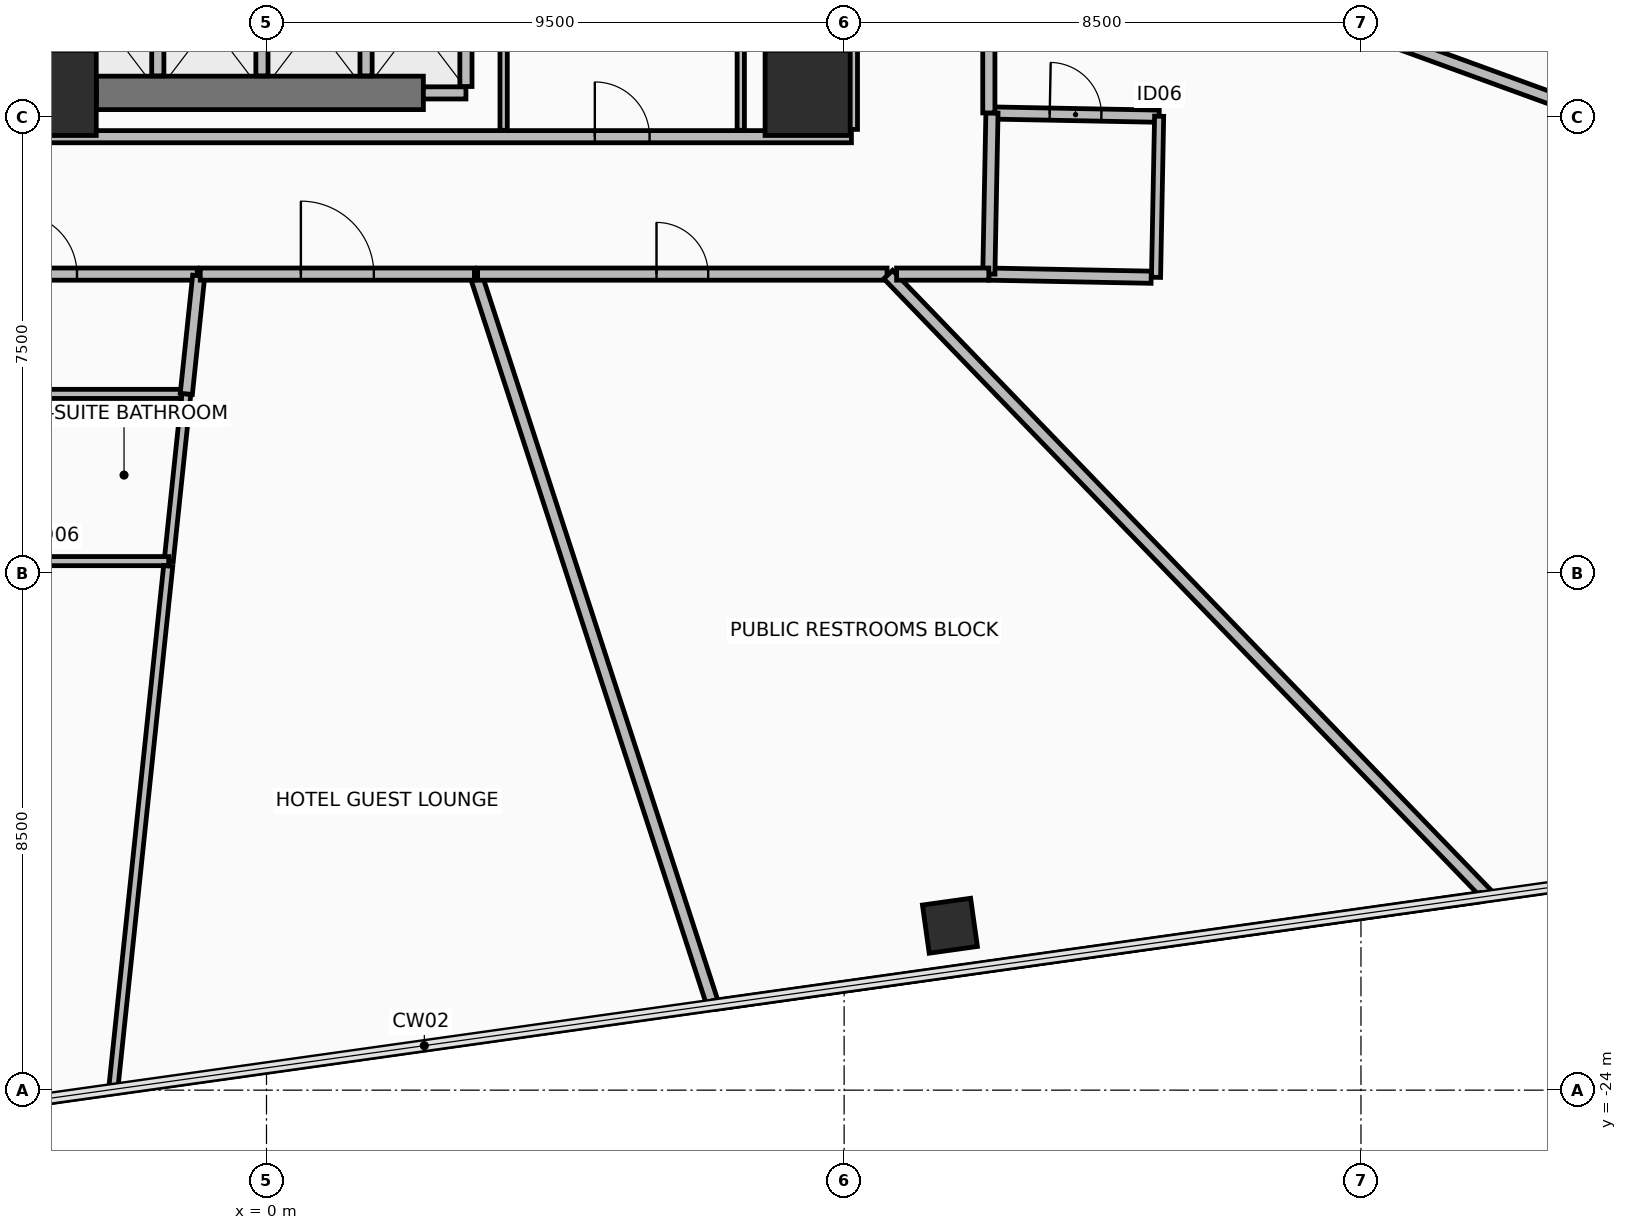
"""IFC4 building model, lengths in metres.
Left out: names, types, materials, properties, quantities, classifications, styles, units other than length and angle.
Written with IfcOpenShell. Run it as: python <this file> out.ifc"""

import sys

from ifc_helpers import new_model, si_unit, direction, frame, frame_2d, origin, origin_2d, place, context, subcontext, project, spatial, rectangle, hollow_rectangle, extrude, element, fill, save


model = new_model("IFC4")
c1 = context("Model", 3, precision=1e-05, world=origin(), true_north=direction((0.0, 1.0)))
c2 = subcontext(c1, "Body", "Model", "MODEL_VIEW")
j1 = project(units=[si_unit("LENGTHUNIT", "METRE"), si_unit("PLANEANGLEUNIT", "RADIAN")], contexts=[c1])
p1 = place(None, origin())
s1 = spatial("IfcSite", under=j1, at=p1, CompositionType="ELEMENT")
p2 = place(p1, origin())
s2 = spatial("IfcBuilding", under=s1, at=p2, CompositionType="ELEMENT")
p3 = place(p2, frame((0.0, 0.0, 63.85)))
s3 = spatial("IfcBuildingStorey", under=s2, at=p3, CompositionType="ELEMENT", Elevation=63.85)
for number, where, z_axis, x_axis in (
    (1, (-3.5, -7.6, 0.0), (0.0, 0.0, 1.0), (1.0, 0.0, 0.0)),
    (2, (8.9, -7.6, 0.0), (0.0, 0.0, 1.0), (1.0, 0.0, 0.0)),
):
    element("IfcColumn", number, at=place(p3, frame(where, z_axis=z_axis, x_axis=x_axis)), inside=s3, PredefinedType="COLUMN", context=c2, shape_type="SweptSolid", body=[
        extrude(rectangle(XDim=1.4, YDim=1.4, at=origin_2d()), origin(), (0.0, 0.0, 1.0), 3.45),
    ])
p4 = place(p3, frame((11.24, -21.296, 0.0), z_axis=(0.0, 0.0, 1.0), x_axis=(0.990268068742, 0.13917310096, 0.0)))
e3 = element("IfcColumn", 3, at=p4, inside=s3, PredefinedType="COLUMN", context=c2, shape_type="SweptSolid", body=[
    extrude(hollow_rectangle(XDim=0.8, YDim=0.8, WallThickness=0.045, at=origin_2d()), origin(), (0.0, 0.0, 1.0), 3.45),
])
p5 = place(p3, frame((-2.8, -7.6, 0.0), z_axis=(0.0, 0.0, 1.0), x_axis=(1.0, 0.0, 0.0)))
e4 = element("IfcWall", 4, at=p5, inside=s3, PredefinedType="SHEAR", context=c2, shape_type="SweptSolid", body=[
    extrude(rectangle(XDim=5.38, YDim=0.55, at=frame_2d((2.69, 0.0))), origin(), (0.0, 0.0, 1.0), 3.275),
])
p6 = place(p3, frame((-9.62, -8.32, 0.0), z_axis=(0.0, 0.0, 1.0), x_axis=(1.0, 0.0, 0.0)))
e5 = element("IfcWall", 5, at=p6, inside=s3, PredefinedType="PARTITIONING", context=c2, shape_type="SweptSolid", body=[
    extrude(rectangle(XDim=19.24, YDim=0.2, at=frame_2d((9.62, 0.0))), origin(), (0.0, 0.0, 1.0), 2.67),
])
p7 = place(p6, frame((15.02, 0.0, 0.0)))
e6 = element("IfcOpeningElement", 6, at=p7, cuts=e5, PredefinedType="OPENING", context=c2, shape_type="SweptSolid", body=[
    extrude(rectangle(XDim=0.9, YDim=2.1, at=frame_2d((0.45, 1.05))), frame((0.0, 0.11, 0.0), z_axis=(0.0, -1.0, 0.0), x_axis=(1.0, 0.0, 0.0)), (0.0, 0.0, 1.0), 0.22),
])
p8 = place(p3, frame((9.62, -8.2, 0.0), z_axis=(0.0, 0.0, 1.0), x_axis=(0.0, 1.0, 0.0)))
e7 = element("IfcWall", 7, at=p8, inside=s3, PredefinedType="PARTITIONING", context=c2, shape_type="SweptSolid", body=[
    extrude(rectangle(XDim=16.4, YDim=0.2, at=frame_2d((8.2, 0.0))), origin(), (0.0, 0.0, 1.0), 2.67),
])
p9 = place(p8, frame((12.65, 0.0, 0.0)))
e8 = element("IfcOpeningElement", 8, at=p9, cuts=e7, PredefinedType="OPENING", context=c2, shape_type="SweptSolid", body=[
    extrude(rectangle(XDim=1.1, YDim=2.15, at=frame_2d((0.55, 1.075))), frame((0.0, 0.11, 0.0), z_axis=(0.0, -1.0, 0.0), x_axis=(1.0, 0.0, 0.0)), (0.0, 0.0, 1.0), 0.22),
])
p10 = place(p3, frame((-3.5, -7.6, 0.0), z_axis=(0.0, 0.0, 1.0), x_axis=(1.0, 0.0, 0.0)))
e9 = element("IfcWall", 9, at=p10, inside=s3, PredefinedType="PARTITIONING", context=c2, shape_type="SweptSolid", body=[
    extrude(rectangle(XDim=0.7, YDim=0.2, at=frame_2d((0.35, 0.0))), origin(), (0.0, 0.0, 1.0), 2.47),
])
p11 = place(p3, frame((-3.5, -7.495, 0.0), z_axis=(0.0, 0.0, 1.0), x_axis=(0.0, 1.0, 0.0)))
e10 = element("IfcWall", 10, at=p11, inside=s3, PredefinedType="PARTITIONING", context=c2, shape_type="SweptSolid", body=[
    extrude(rectangle(XDim=2.065, YDim=0.2, at=frame_2d((1.033, 0.0))), origin(), (0.0, 0.0, 1.0), 2.47),
])
for number, where, z_axis, x_axis in (
    (11, (-1.788, -7.32, 0.0), (0.0, 0.0, 1.0), (0.0, 1.0, 0.0)),
    (12, (-0.075, -7.32, 0.0), (0.0, 0.0, 1.0), (0.0, 1.0, 0.0)),
    (13, (1.637, -7.32, 0.0), (0.0, 0.0, 1.0), (0.0, 1.0, 0.0)),
):
    element("IfcWall", number, at=place(p3, frame(where, z_axis=z_axis, x_axis=x_axis)), inside=s3, PredefinedType="PARTITIONING", context=c2, shape_type="SweptSolid", body=[
        extrude(rectangle(XDim=1.89, YDim=0.2, at=frame_2d((0.945, 0.0))), origin(), (0.0, 0.0, 1.0), 3.275),
    ])
p12 = place(p3, frame((2.58, -7.6, 0.0), z_axis=(0.0, 0.0, 1.0), x_axis=(1.0, 0.0, 0.0)))
e14 = element("IfcWall", 14, at=p12, inside=s3, PredefinedType="PARTITIONING", context=c2, shape_type="SweptSolid", body=[
    extrude(rectangle(XDim=0.7, YDim=0.2, at=frame_2d((0.35, 0.0))), origin(), (0.0, 0.0, 1.0), 2.47),
])
p13 = place(p3, frame((3.28, -7.495, 0.0), z_axis=(0.0, 0.0, 1.0), x_axis=(0.0, 1.0, 0.0)))
e15 = element("IfcWall", 15, at=p13, inside=s3, PredefinedType="PARTITIONING", context=c2, shape_type="SweptSolid", body=[
    extrude(rectangle(XDim=2.065, YDim=0.2, at=frame_2d((1.033, 0.0))), origin(), (0.0, 0.0, 1.0), 2.47),
])
p14 = place(p3, frame((7.8, -8.215, 0.0), z_axis=(0.0, 0.0, 1.0), x_axis=(0.0, 1.0, 0.0)))
e16 = element("IfcWall", 16, at=p14, inside=s3, PredefinedType="PARTITIONING", context=c2, shape_type="SweptSolid", body=[
    extrude(rectangle(XDim=4.015, YDim=0.12, at=frame_2d((2.008, 0.0))), origin(), (0.0, 0.0, 1.0), 2.47),
])
p15 = place(p3, frame((3.9, -4.265, 0.0), z_axis=(0.0, 0.0, 1.0), x_axis=(0.0, -1.0, 0.0)))
e17 = element("IfcWall", 17, at=p15, inside=s3, PredefinedType="PARTITIONING", context=c2, shape_type="SweptSolid", body=[
    extrude(rectangle(XDim=3.95, YDim=0.12, at=frame_2d((1.975, 0.0))), origin(), (0.0, 0.0, 1.0), 2.47),
])
p16 = place(p3, frame((-1.319, -12.55, 0.0), z_axis=(0.0, 0.0, 1.0), x_axis=(-0.104537710696, -0.994520923381, 0.0)))
e18 = element("IfcWall", 18, at=p16, inside=s3, PredefinedType="PARTITIONING", context=c2, shape_type="SweptSolid", body=[
    extrude(rectangle(XDim=2.765, YDim=0.15, at=frame_2d((1.383, 0.0))), origin(), (0.0, 0.0, 1.0), 3.275),
])
p17 = place(p3, frame((-1.608, -15.3, 0.0), z_axis=(0.0, 0.0, 1.0), x_axis=(-1.0, 0.0, 0.0)))
e19 = element("IfcWall", 19, at=p17, inside=s3, PredefinedType="PARTITIONING", context=c2, shape_type="SweptSolid", body=[
    extrude(rectangle(XDim=2.167, YDim=0.15, at=frame_2d((1.083, 0.0))), origin(), (0.0, 0.0, 1.0), 3.275),
])
p18 = place(p3, frame((-3.695, -12.55, 0.0), z_axis=(0.0, 0.0, 1.0), x_axis=(1.0, 0.0, 0.0)))
e20 = element("IfcWall", 20, at=p18, inside=s3, PredefinedType="PARTITIONING", context=c2, shape_type="SweptSolid", body=[
    extrude(rectangle(XDim=2.295, YDim=0.15, at=frame_2d((1.147, 0.0))), origin(), (0.0, 0.0, 1.0), 3.275),
])
p19 = place(p3, frame((11.931, -7.93, 0.0), z_axis=(0.0, 0.0, 1.0), x_axis=(0.999812703389, -0.019353504647, 0.0)))
e21 = element("IfcWall", 21, at=p19, inside=s3, PredefinedType="PARTITIONING", context=c2, shape_type="SweptSolid", body=[
    extrude(rectangle(XDim=2.75, YDim=0.2, at=frame_2d((1.375, 0.0))), origin(), (0.0, 0.0, 1.0), 3.275),
])
p20 = place(p19, frame((0.95, 0.0, 0.0)))
e22 = element("IfcOpeningElement", 22, at=p20, cuts=e21, PredefinedType="OPENING", context=c2, shape_type="SweptSolid", body=[
    extrude(rectangle(XDim=0.85, YDim=2.1, at=frame_2d((0.425, 1.05))), frame((0.0, 0.11, 0.0), z_axis=(0.0, -1.0, 0.0), x_axis=(1.0, 0.0, 0.0)), (0.0, 0.0, 1.0), 0.22),
])
p21 = place(p3, frame((14.681, -7.984, 0.0), z_axis=(0.0, 0.0, 1.0), x_axis=(-0.01934764942, -0.999812816712, 0.0)))
e23 = element("IfcWall", 23, at=p21, inside=s3, PredefinedType="PARTITIONING", context=c2, shape_type="SweptSolid", body=[
    extrude(rectangle(XDim=2.65, YDim=0.15, at=frame_2d((1.325, 0.0))), origin(), (0.0, 0.0, 1.0), 2.67),
])
p22 = place(p3, frame((14.55, -10.632, 0.0), z_axis=(0.0, 0.0, 1.0), x_axis=(-0.999813887268, 0.019292247848, 0.0)))
e24 = element("IfcWall", 24, at=p22, inside=s3, PredefinedType="PARTITIONING", context=c2, shape_type="SweptSolid", body=[
    extrude(rectangle(XDim=2.67, YDim=0.2, at=frame_2d((1.335, 0.0))), origin(), (0.0, 0.0, 1.0), 2.67),
])
p23 = place(p3, frame((11.88, -10.579, 0.0), z_axis=(0.0, 0.0, 1.0), x_axis=(0.019356564513, 0.999812644154, 0.0)))
e25 = element("IfcWall", 25, at=p23, inside=s3, PredefinedType="PARTITIONING", context=c2, shape_type="SweptSolid", body=[
    extrude(rectangle(XDim=2.649, YDim=0.2, at=frame_2d((1.324, 0.0))), origin(), (0.0, 0.0, 1.0), 2.67),
])
p24 = place(p3, frame((7.337, -22.581, 0.0), z_axis=(0.0, 0.0, 1.0), x_axis=(-0.309025096648, 0.951053883669, 0.0)))
e26 = element("IfcWall", 26, at=p24, inside=s3, PredefinedType="PARTITIONING", context=c2, shape_type="SweptSolid", body=[
    extrude(rectangle(XDim=12.584, YDim=0.2, at=frame_2d((6.292, 0.0))), origin(), (0.0, 0.0, 1.0), 2.47),
])
p25 = place(p3, frame((3.472, -10.58, 0.0), z_axis=(0.0, 0.0, 1.0), x_axis=(1.0, 0.0, 0.0)))
e27 = element("IfcWall", 27, at=p25, inside=s3, PredefinedType="PARTITIONING", context=c2, shape_type="SweptSolid", body=[
    extrude(rectangle(XDim=6.734, YDim=0.2, at=frame_2d((3.367, 0.0))), origin(), (0.0, 0.0, 1.0), 2.67),
])
p26 = place(p25, frame((2.942, 0.0, 0.0)))
e28 = element("IfcOpeningElement", 28, at=p26, cuts=e27, PredefinedType="OPENING", context=c2, shape_type="SweptSolid", body=[
    extrude(rectangle(XDim=0.85, YDim=2.1, at=frame_2d((0.425, 1.05))), frame((0.0, 0.11, 0.0), z_axis=(0.0, -1.0, 0.0), x_axis=(1.0, 0.0, 0.0)), (0.0, 0.0, 1.0), 0.22),
])
p27 = place(p3, frame((10.224, -10.588, 0.0), z_axis=(0.0, 0.0, 1.0), x_axis=(0.694662887415, -0.719335438337, 0.0)))
e29 = element("IfcWall", 29, at=p27, inside=s3, PredefinedType="PARTITIONING", context=c2, shape_type="SweptSolid", body=[
    extrude(rectangle(XDim=14.209, YDim=0.2, at=frame_2d((7.105, 0.0))), origin(), (0.0, 0.0, 1.0), 2.47),
])
p28 = place(p3, frame((19.967, -20.827, 0.0), z_axis=(0.0, 0.0, 1.0), x_axis=(-0.990266579607, -0.139183696289, 0.0)))
e30 = element("IfcWall", 30, at=p28, inside=s3, PredefinedType="PARTITIONING", context=c2, shape_type="SweptSolid", body=[
    extrude(rectangle(XDim=12.726, YDim=0.15, at=frame_2d((6.363, 0.0))), origin(), (0.0, 0.0, 1.0), 3.275),
])
p29 = place(p3, frame((-6.094, -10.58, 0.0), z_axis=(0.0, 0.0, 1.0), x_axis=(1.0, 0.0, 0.0)))
e31 = element("IfcWall", 31, at=p29, inside=s3, PredefinedType="PARTITIONING", context=c2, shape_type="SweptSolid", body=[
    extrude(rectangle(XDim=4.954, YDim=0.2, at=frame_2d((2.477, 0.0))), origin(), (0.0, 0.0, 1.0), 3.275),
])
p30 = place(p29, frame((1.977, 0.0, 0.0)))
e32 = element("IfcOpeningElement", 32, at=p30, cuts=e31, PredefinedType="OPENING", context=c2, shape_type="SweptSolid", body=[
    extrude(rectangle(XDim=1.0, YDim=2.15, at=frame_2d((0.5, 1.075))), frame((0.0, 0.11, 0.0), z_axis=(0.0, -1.0, 0.0), x_axis=(1.0, 0.0, 0.0)), (0.0, 0.0, 1.0), 0.22),
])
p31 = place(p3, frame((-1.115, -10.608, 0.0), z_axis=(0.0, 0.0, 1.0), x_axis=(-0.104502586471, -0.994524614789, 0.0)))
e33 = element("IfcWall", 33, at=p31, inside=s3, PredefinedType="PARTITIONING", context=c2, shape_type="SweptSolid", body=[
    extrude(rectangle(XDim=1.953, YDim=0.2, at=frame_2d((0.977, 0.0))), origin(), (0.0, 0.0, 1.0), 3.275),
])
p32 = place(p3, frame((-1.616, -15.38, 0.0), z_axis=(0.0, 0.0, 1.0), x_axis=(-0.104546448857, -0.994520004842, 0.0)))
e34 = element("IfcWall", 34, at=p32, inside=s3, PredefinedType="PARTITIONING", context=c2, shape_type="SweptSolid", body=[
    extrude(rectangle(XDim=8.636, YDim=0.15, at=frame_2d((4.318, 0.0))), origin(), (0.0, 0.0, 1.0), 2.47),
])
p33 = place(p3, frame((-1.09, -10.58, 0.0), z_axis=(0.0, 0.0, 1.0), x_axis=(1.0, 0.0, 0.0)))
e35 = element("IfcWall", 35, at=p33, inside=s3, PredefinedType="PARTITIONING", context=c2, shape_type="SweptSolid", body=[
    extrude(rectangle(XDim=4.509, YDim=0.2, at=frame_2d((2.254, 0.0))), origin(), (0.0, 0.0, 1.0), 3.275),
])
p34 = place(p33, frame((1.655, 0.0, 0.0)))
e36 = element("IfcOpeningElement", 36, at=p34, cuts=e35, PredefinedType="OPENING", context=c2, shape_type="SweptSolid", body=[
    extrude(rectangle(XDim=1.2, YDim=2.15, at=frame_2d((0.6, 1.075))), frame((0.0, 0.11, 0.0), z_axis=(0.0, -1.0, 0.0), x_axis=(1.0, 0.0, 0.0)), (0.0, 0.0, 1.0), 0.22),
])
p35 = place(p3, frame((17.274, -6.287, 0.0), z_axis=(0.0, 0.0, 1.0), x_axis=(0.939692436803, -0.342020648814, 0.0)))
e37 = element("IfcWall", 37, at=p35, inside=s3, PredefinedType="PARTITIONING", context=c2, shape_type="SweptSolid", body=[
    extrude(rectangle(XDim=11.228, YDim=0.2, at=frame_2d((5.614, 0.0))), origin(), (0.0, 0.0, 1.0), 2.47),
])
p36 = place(p3, frame((10.363, -10.58, 0.0), z_axis=(0.0, 0.0, 1.0), x_axis=(1.0, 0.0, 0.0)))
e38 = element("IfcWall", 38, at=p36, inside=s3, PredefinedType="PARTITIONING", context=c2, shape_type="SweptSolid", body=[
    extrude(rectangle(XDim=1.516, YDim=0.2, at=frame_2d((0.758, 0.0))), origin(), (0.0, 0.0, 1.0), 3.275),
])
p37 = place(p3, frame((11.88, -7.929, 0.0), z_axis=(0.0, 0.0, 1.0), x_axis=(0.0, 1.0, 0.0)))
e39 = element("IfcWall", 39, at=p37, inside=s3, PredefinedType="PARTITIONING", context=c2, shape_type="SweptSolid", body=[
    extrude(rectangle(XDim=3.494, YDim=0.2, at=frame_2d((1.747, 0.0))), origin(), (0.0, 0.0, 1.0), 2.67),
])
p38 = place(p37, frame((1.247, 0.0, 0.0)))
e40 = element("IfcOpeningElement", 40, at=p38, cuts=e39, PredefinedType="OPENING", context=c2, shape_type="SweptSolid", body=[
    extrude(rectangle(XDim=1.0, YDim=2.15, at=frame_2d((0.5, 1.075))), frame((0.0, 0.11, 0.0), z_axis=(0.0, -1.0, 0.0), x_axis=(1.0, 0.0, 0.0)), (0.0, 0.0, 1.0), 0.22),
])
p39 = place(p7, origin())
e41 = element("IfcDoor", 41, at=p39, inside=s3, OperationType="SINGLE_SWING_LEFT", PredefinedType="DOOR", context=c2, shape_type="SweptSolid", body=[
    extrude(rectangle(XDim=0.9, YDim=2.1, at=frame_2d((0.45, 1.05))), frame((0.0, 0.025, 0.0), z_axis=(0.0, -1.0, 0.0), x_axis=(1.0, 0.0, 0.0)), (0.0, 0.0, 1.0), 0.05),
])
fill(e6, e41)
p40 = place(p20, origin())
e42 = element("IfcDoor", 42, at=p40, inside=s3, OperationType="SINGLE_SWING_RIGHT", PredefinedType="DOOR", context=c2, shape_type="SweptSolid", body=[
    extrude(rectangle(XDim=0.85, YDim=2.1, at=frame_2d((0.425, 1.05))), frame((0.0, 0.025, 0.0), z_axis=(0.0, -1.0, 0.0), x_axis=(1.0, 0.0, 0.0)), (0.0, 0.0, 1.0), 0.05),
])
fill(e22, e42)
p41 = place(p26, origin())
e43 = element("IfcDoor", 43, at=p41, inside=s3, OperationType="SINGLE_SWING_RIGHT", PredefinedType="DOOR", context=c2, shape_type="SweptSolid", body=[
    extrude(rectangle(XDim=0.85, YDim=2.1, at=frame_2d((0.425, 1.05))), frame((0.0, 0.025, 0.0), z_axis=(0.0, -1.0, 0.0), x_axis=(1.0, 0.0, 0.0)), (0.0, 0.0, 1.0), 0.05),
])
fill(e28, e43)
p42 = place(p30, origin())
e44 = element("IfcDoor", 44, at=p42, inside=s3, OperationType="SINGLE_SWING_LEFT", PredefinedType="DOOR", context=c2, shape_type="SweptSolid", body=[
    extrude(rectangle(XDim=1.0, YDim=2.15, at=frame_2d((0.5, 1.075))), frame((0.0, 0.025, 0.0), z_axis=(0.0, -1.0, 0.0), x_axis=(1.0, 0.0, 0.0)), (0.0, 0.0, 1.0), 0.05),
])
fill(e32, e44)
p43 = place(p34, origin())
e45 = element("IfcDoor", 45, at=p43, inside=s3, OperationType="SINGLE_SWING_LEFT", PredefinedType="DOOR", context=c2, shape_type="SweptSolid", body=[
    extrude(rectangle(XDim=1.2, YDim=2.15, at=frame_2d((0.6, 1.075))), frame((0.0, 0.025, 0.0), z_axis=(0.0, -1.0, 0.0), x_axis=(1.0, 0.0, 0.0)), (0.0, 0.0, 1.0), 0.05),
])
fill(e36, e45)
save(model, sys.argv[1])
